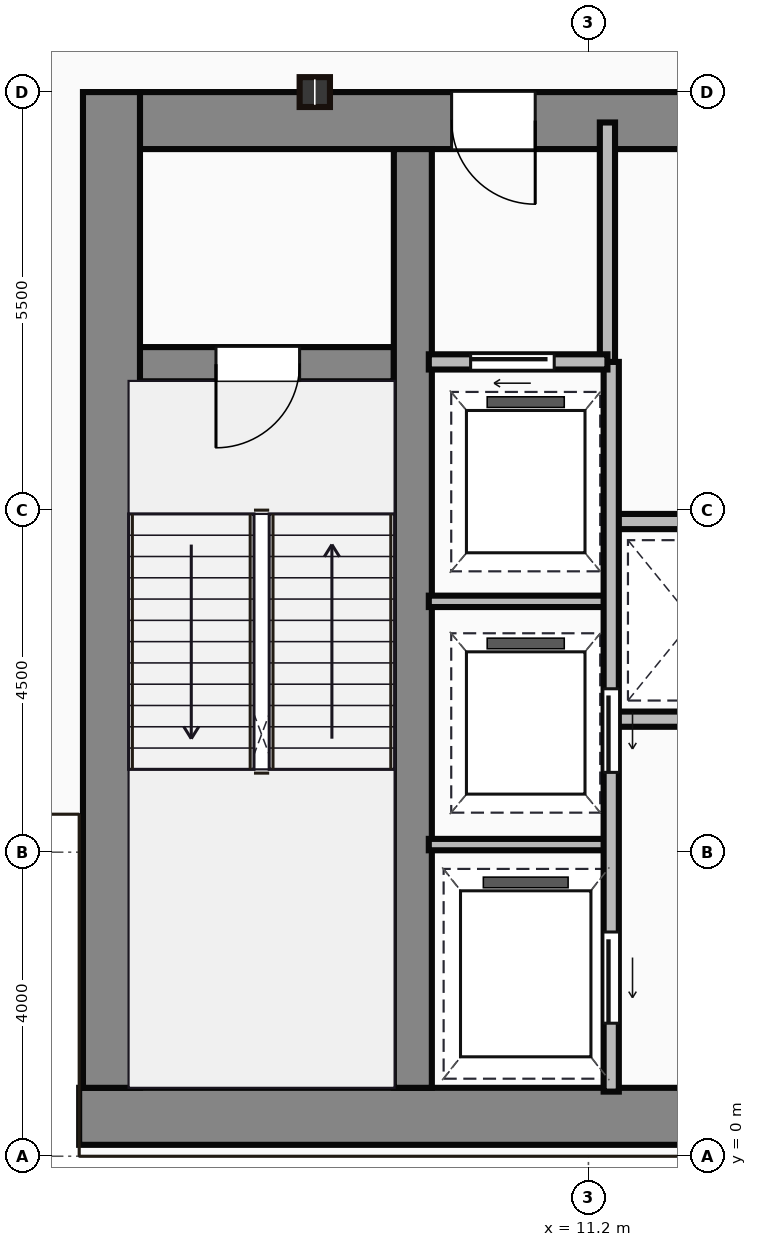
"""IFC4 building model, lengths in metres.
Left out: names, types, materials, properties, quantities, classifications, styles, units other than length and angle.
Written with IfcOpenShell. Run it as: python <this file> out.ifc"""

import sys

from ifc_helpers import new_model, si_unit, direction, frame, frame_2d, origin, origin_2d, place, context, subcontext, project, spatial, rectangle, i_section, extrude, source, transform, mapped, element, fill, save


model = new_model("IFC4")
c1 = context("Model", 3, precision=1e-05, world=origin(), true_north=direction((0.0, 1.0)))
c2 = subcontext(c1, "Body", "Model", "MODEL_VIEW")
j1 = project(units=[si_unit("LENGTHUNIT", "METRE"), si_unit("PLANEANGLEUNIT", "RADIAN")], contexts=[c1])
p1 = place(None, origin())
s1 = spatial("IfcSite", under=j1, at=p1, CompositionType="ELEMENT")
p2 = place(p1, origin())
s2 = spatial("IfcBuilding", under=s1, at=p2, CompositionType="ELEMENT")
p3 = place(p2, frame((0.0, 0.0, 136.1)))
s3 = spatial("IfcBuildingStorey", under=s2, at=p3, CompositionType="ELEMENT", Elevation=136.1)
m1 = source(origin(), c2, "Body", "SweptSolid", [
    extrude(rectangle(XDim=29.5, YDim=0.75, at=frame_2d((14.75, 0.0))), origin(), (0.0, 0.0, 1.0), 4.5),
])
p4 = place(p3, frame((4.5, 0.525, 0.0), z_axis=(0.0, 0.0, 1.0), x_axis=(1.0, 0.0, 0.0)))
e1 = element("IfcWall", 1, at=p4, inside=s3, PredefinedType="SHEAR", context=c2, shape_type="MappedRepresentation", body=[
    mapped(m1, transform((0.0, 0.0, 0.0))),
])
m2 = source(origin(), c2, "Body", "SweptSolid", [
    extrude(rectangle(XDim=13.1, YDim=0.75, at=frame_2d((6.55, 0.0))), origin(), (0.0, 0.0, 1.0), 4.5),
])
p5 = place(p3, frame((4.925, 0.9, 0.0), z_axis=(0.0, 0.0, 1.0), x_axis=(0.0, 1.0, 0.0)))
e2 = element("IfcWall", 2, at=p5, inside=s3, PredefinedType="SHEAR", context=c2, shape_type="MappedRepresentation", body=[
    mapped(m2, transform((0.0, 0.0, 0.0))),
])
m3 = source(origin(), c2, "Body", "SweptSolid", [
    extrude(rectangle(XDim=9.1, YDim=0.75, at=frame_2d((4.55, 0.0))), origin(), (0.0, 0.0, 1.0), 4.5),
])
p6 = place(p3, frame((5.3, 13.625, 0.0), z_axis=(0.0, 0.0, 1.0), x_axis=(1.0, 0.0, 0.0)))
e3 = element("IfcWall", 3, at=p6, inside=s3, PredefinedType="SHEAR", context=c2, shape_type="MappedRepresentation", body=[
    mapped(m3, transform((0.0, 0.0, 0.0))),
])
p7 = place(p6, frame((4.1, 0.0, 0.0)))
e4 = element("IfcOpeningElement", 4, at=p7, cuts=e3, PredefinedType="OPENING", context=c2, shape_type="SweptSolid", body=[
    extrude(rectangle(XDim=1.1, YDim=2.15, at=frame_2d((0.55, 1.075))), frame((0.0, 0.385, 0.0), z_axis=(0.0, -1.0, 0.0), x_axis=(1.0, 0.0, 0.0)), (0.0, 0.0, 1.0), 0.77),
])
m4 = source(origin(), c2, "Body", "SweptSolid", [
    extrude(rectangle(XDim=12.35, YDim=0.5, at=frame_2d((6.175, 0.0))), origin(), (0.0, 0.0, 1.0), 4.5),
])
p8 = place(p3, frame((8.89, 0.9, 0.0), z_axis=(0.0, 0.0, 1.0), x_axis=(0.0, 1.0, 0.0)))
e5 = element("IfcWall", 5, at=p8, inside=s3, PredefinedType="SHEAR", context=c2, shape_type="MappedRepresentation", body=[
    mapped(m4, transform((0.0, 0.0, 0.0))),
])
m5 = source(origin(), c2, "Body", "SweptSolid", [
    extrude(rectangle(XDim=3.39, YDim=0.45, at=frame_2d((1.695, 0.0))), origin(), (0.0, 0.0, 1.0), 4.5),
])
p9 = place(p3, frame((5.25, 10.42, 0.0), z_axis=(0.0, 0.0, 1.0), x_axis=(1.0, 0.0, 0.0)))
e6 = element("IfcWall", 6, at=p9, inside=s3, PredefinedType="SHEAR", context=c2, shape_type="MappedRepresentation", body=[
    mapped(m5, transform((0.0, 0.0, 0.0))),
])
p10 = place(p9, frame((1.05, 0.0, 0.0)))
e7 = element("IfcOpeningElement", 7, at=p10, cuts=e6, PredefinedType="OPENING", context=c2, shape_type="SweptSolid", body=[
    extrude(rectangle(XDim=1.1, YDim=2.15, at=frame_2d((0.55, 1.075))), frame((0.0, 0.235, 0.0), z_axis=(0.0, -1.0, 0.0), x_axis=(1.0, 0.0, 0.0)), (0.0, 0.0, 1.0), 0.47),
])
m6 = source(origin(), c2, "Body", "SweptSolid", [
    extrude(i_section(OverallWidth=0.399, OverallDepth=0.393, WebThickness=0.023, FlangeThickness=0.037, at=origin_2d()), origin(), (0.0, 0.0, 1.0), 4.5),
])
p11 = place(p3, frame((7.6, 14.0, 0.0), z_axis=(0.0, 0.0, 1.0), x_axis=(1.0, 0.0, 0.0)))
e8 = element("IfcColumn", 8, at=p11, inside=s3, PredefinedType="COLUMN", context=c2, shape_type="MappedRepresentation", body=[
    mapped(m6, transform((0.0, 0.0, 0.0))),
])
m7 = source(origin(), c2, "Body", "SweptSolid", [
    extrude(rectangle(XDim=3.18, YDim=0.2, at=frame_2d((1.59, 0.0))), origin(), (0.0, 0.0, 1.0), 4.25),
])
p12 = place(p3, frame((11.45, 10.42, 0.0), z_axis=(0.0, 0.0, 1.0), x_axis=(0.0, 1.0, 0.0)))
e9 = element("IfcWall", 9, at=p12, inside=s3, PredefinedType="PARTITIONING", context=c2, shape_type="MappedRepresentation", body=[
    mapped(m7, transform((0.0, 0.0, 0.0))),
])
m8 = source(origin(), c2, "Body", "SweptSolid", [
    extrude(rectangle(XDim=2.35, YDim=0.2, at=frame_2d((1.175, 0.0))), origin(), (0.0, 0.0, 1.0), 4.25),
])
p13 = place(p3, frame((9.1, 10.45, 0.0), z_axis=(0.0, 0.0, 1.0), x_axis=(1.0, 0.0, 0.0)))
e10 = element("IfcWall", 10, at=p13, inside=s3, PredefinedType="PARTITIONING", context=c2, shape_type="MappedRepresentation", body=[
    mapped(m8, transform((0.0, 0.0, 0.0))),
])
p14 = place(p13, frame((0.55, 0.0, 0.0)))
e11 = element("IfcOpeningElement", 11, at=p14, cuts=e10, PredefinedType="OPENING", context=c2, shape_type="SweptSolid", body=[
    extrude(rectangle(XDim=1.1, YDim=2.15, at=frame_2d((0.55, 1.075))), frame((0.0, 0.11, 0.0), z_axis=(0.0, -1.0, 0.0), x_axis=(1.0, 0.0, 0.0)), (0.0, 0.0, 1.0), 0.22),
])
m9 = source(origin(), c2, "Body", "SweptSolid", [
    extrude(rectangle(XDim=9.6, YDim=0.2, at=frame_2d((4.8, 0.0))), origin(), (0.0, 0.0, 1.0), 4.25),
])
p15 = place(p3, frame((11.5, 0.85, 0.0), z_axis=(0.0, 0.0, 1.0), x_axis=(0.0, 1.0, 0.0)))
e12 = element("IfcWall", 12, at=p15, inside=s3, PredefinedType="PARTITIONING", context=c2, shape_type="MappedRepresentation", body=[
    mapped(m9, transform((0.0, 0.0, 0.0))),
])
p16 = place(p15, frame((4.2, 0.0, 0.0)))
e13 = element("IfcOpeningElement", 13, at=p16, cuts=e12, PredefinedType="OPENING", context=c2, shape_type="SweptSolid", body=[
    extrude(rectangle(XDim=1.1, YDim=2.15, at=frame_2d((0.55, 1.075))), frame((0.0, 0.11, 0.0), z_axis=(0.0, -1.0, 0.0), x_axis=(1.0, 0.0, 0.0)), (0.0, 0.0, 1.0), 0.22),
])
p17 = place(p15, frame((0.9, 0.0, 0.0)))
e14 = element("IfcOpeningElement", 14, at=p17, cuts=e12, PredefinedType="OPENING", context=c2, shape_type="SweptSolid", body=[
    extrude(rectangle(XDim=1.2, YDim=2.15, at=frame_2d((0.6, 1.075))), frame((0.0, 0.11, 0.0), z_axis=(0.0, -1.0, 0.0), x_axis=(1.0, 0.0, 0.0)), (0.0, 0.0, 1.0), 0.22),
])
m10 = source(origin(), c2, "Body", "SweptSolid", [
    extrude(rectangle(XDim=2.4, YDim=0.15, at=frame_2d((1.2, 0.0))), origin(), (0.0, 0.0, 1.0), 4.25),
])
for number, where, z_axis, x_axis in (
    (15, (9.1, 4.1, 0.0), (0.0, 0.0, 1.0), (1.0, 0.0, 0.0)),
    (16, (9.1, 7.3, 0.0), (0.0, 0.0, 1.0), (1.0, 0.0, 0.0)),
):
    element("IfcWall", number, at=place(p3, frame(where, z_axis=z_axis, x_axis=x_axis)), inside=s3, PredefinedType="PARTITIONING", context=c2, shape_type="MappedRepresentation", body=[
        mapped(m10, transform((0.0, 0.0, 0.0))),
    ])
m11 = source(origin(), c2, "Body", "SweptSolid", [
    extrude(rectangle(XDim=11.85, YDim=0.2, at=frame_2d((5.925, 0.0))), origin(), (0.0, 0.0, 1.0), 4.25),
])
for number, where, z_axis, x_axis in (
    (17, (11.55, 5.75, 0.0), (0.0, 0.0, 1.0), (1.0, 0.0, 0.0)),
    (18, (11.55, 8.35, 0.0), (0.0, 0.0, 1.0), (1.0, 0.0, 0.0)),
):
    element("IfcWall", number, at=place(p3, frame(where, z_axis=z_axis, x_axis=x_axis)), inside=s3, PredefinedType="PARTITIONING", context=c2, shape_type="MappedRepresentation", body=[
        mapped(m11, transform((0.0, 0.0, 0.0))),
    ])
m12 = source(origin(), c2, "Body", "SweptSolid", [
    extrude(rectangle(XDim=1.1, YDim=2.15, at=frame_2d((0.55, 1.075))), frame((0.0, 0.025, 0.0), z_axis=(0.0, -1.0, 0.0), x_axis=(1.0, 0.0, 0.0)), (0.0, 0.0, 1.0), 0.05),
])
p18 = place(p10, frame((1.1, 0.0, 0.0), z_axis=(0.0, 0.0, 1.0), x_axis=(-1.0, 0.0, 0.0)))
e19 = element("IfcDoor", 19, at=p18, inside=s3, OperationType="SINGLE_SWING_LEFT", PredefinedType="DOOR", context=c2, shape_type="MappedRepresentation", body=[
    mapped(m12, transform((0.0, 0.0, 0.0))),
])
fill(e7, e19)
p19 = place(p7, origin())
e20 = element("IfcDoor", 20, at=p19, inside=s3, OperationType="SINGLE_SWING_RIGHT", PredefinedType="DOOR", context=c2, shape_type="MappedRepresentation", body=[
    mapped(m12, transform((0.0, 0.0, 0.0))),
])
fill(e4, e20)
p20 = place(p14, origin())
e21 = element("IfcDoor", 21, at=p20, inside=s3, OperationType="SLIDING_TO_LEFT", PredefinedType="DOOR", context=c2, shape_type="MappedRepresentation", body=[
    mapped(m12, transform((0.0, 0.0, 0.0))),
])
fill(e11, e21)
p21 = place(p16, frame((1.1, 0.0, 0.0), z_axis=(0.0, 0.0, 1.0), x_axis=(-1.0, 0.0, 0.0)))
e22 = element("IfcDoor", 22, at=p21, inside=s3, OperationType="SLIDING_TO_LEFT", PredefinedType="DOOR", context=c2, shape_type="MappedRepresentation", body=[
    mapped(m12, transform((0.0, 0.0, 0.0))),
])
fill(e13, e22)
m13 = source(origin(), c2, "Body", "SweptSolid", [
    extrude(rectangle(XDim=1.2, YDim=2.15, at=frame_2d((0.6, 1.075))), frame((0.0, 0.025, 0.0), z_axis=(0.0, -1.0, 0.0), x_axis=(1.0, 0.0, 0.0)), (0.0, 0.0, 1.0), 0.05),
])
p22 = place(p17, frame((1.2, 0.0, 0.0), z_axis=(0.0, 0.0, 1.0), x_axis=(-1.0, 0.0, 0.0)))
e23 = element("IfcDoor", 23, at=p22, inside=s3, OperationType="SLIDING_TO_LEFT", PredefinedType="DOOR", context=c2, shape_type="MappedRepresentation", body=[
    mapped(m13, transform((0.0, 0.0, 0.0))),
])
fill(e14, e23)
save(model, sys.argv[1])
